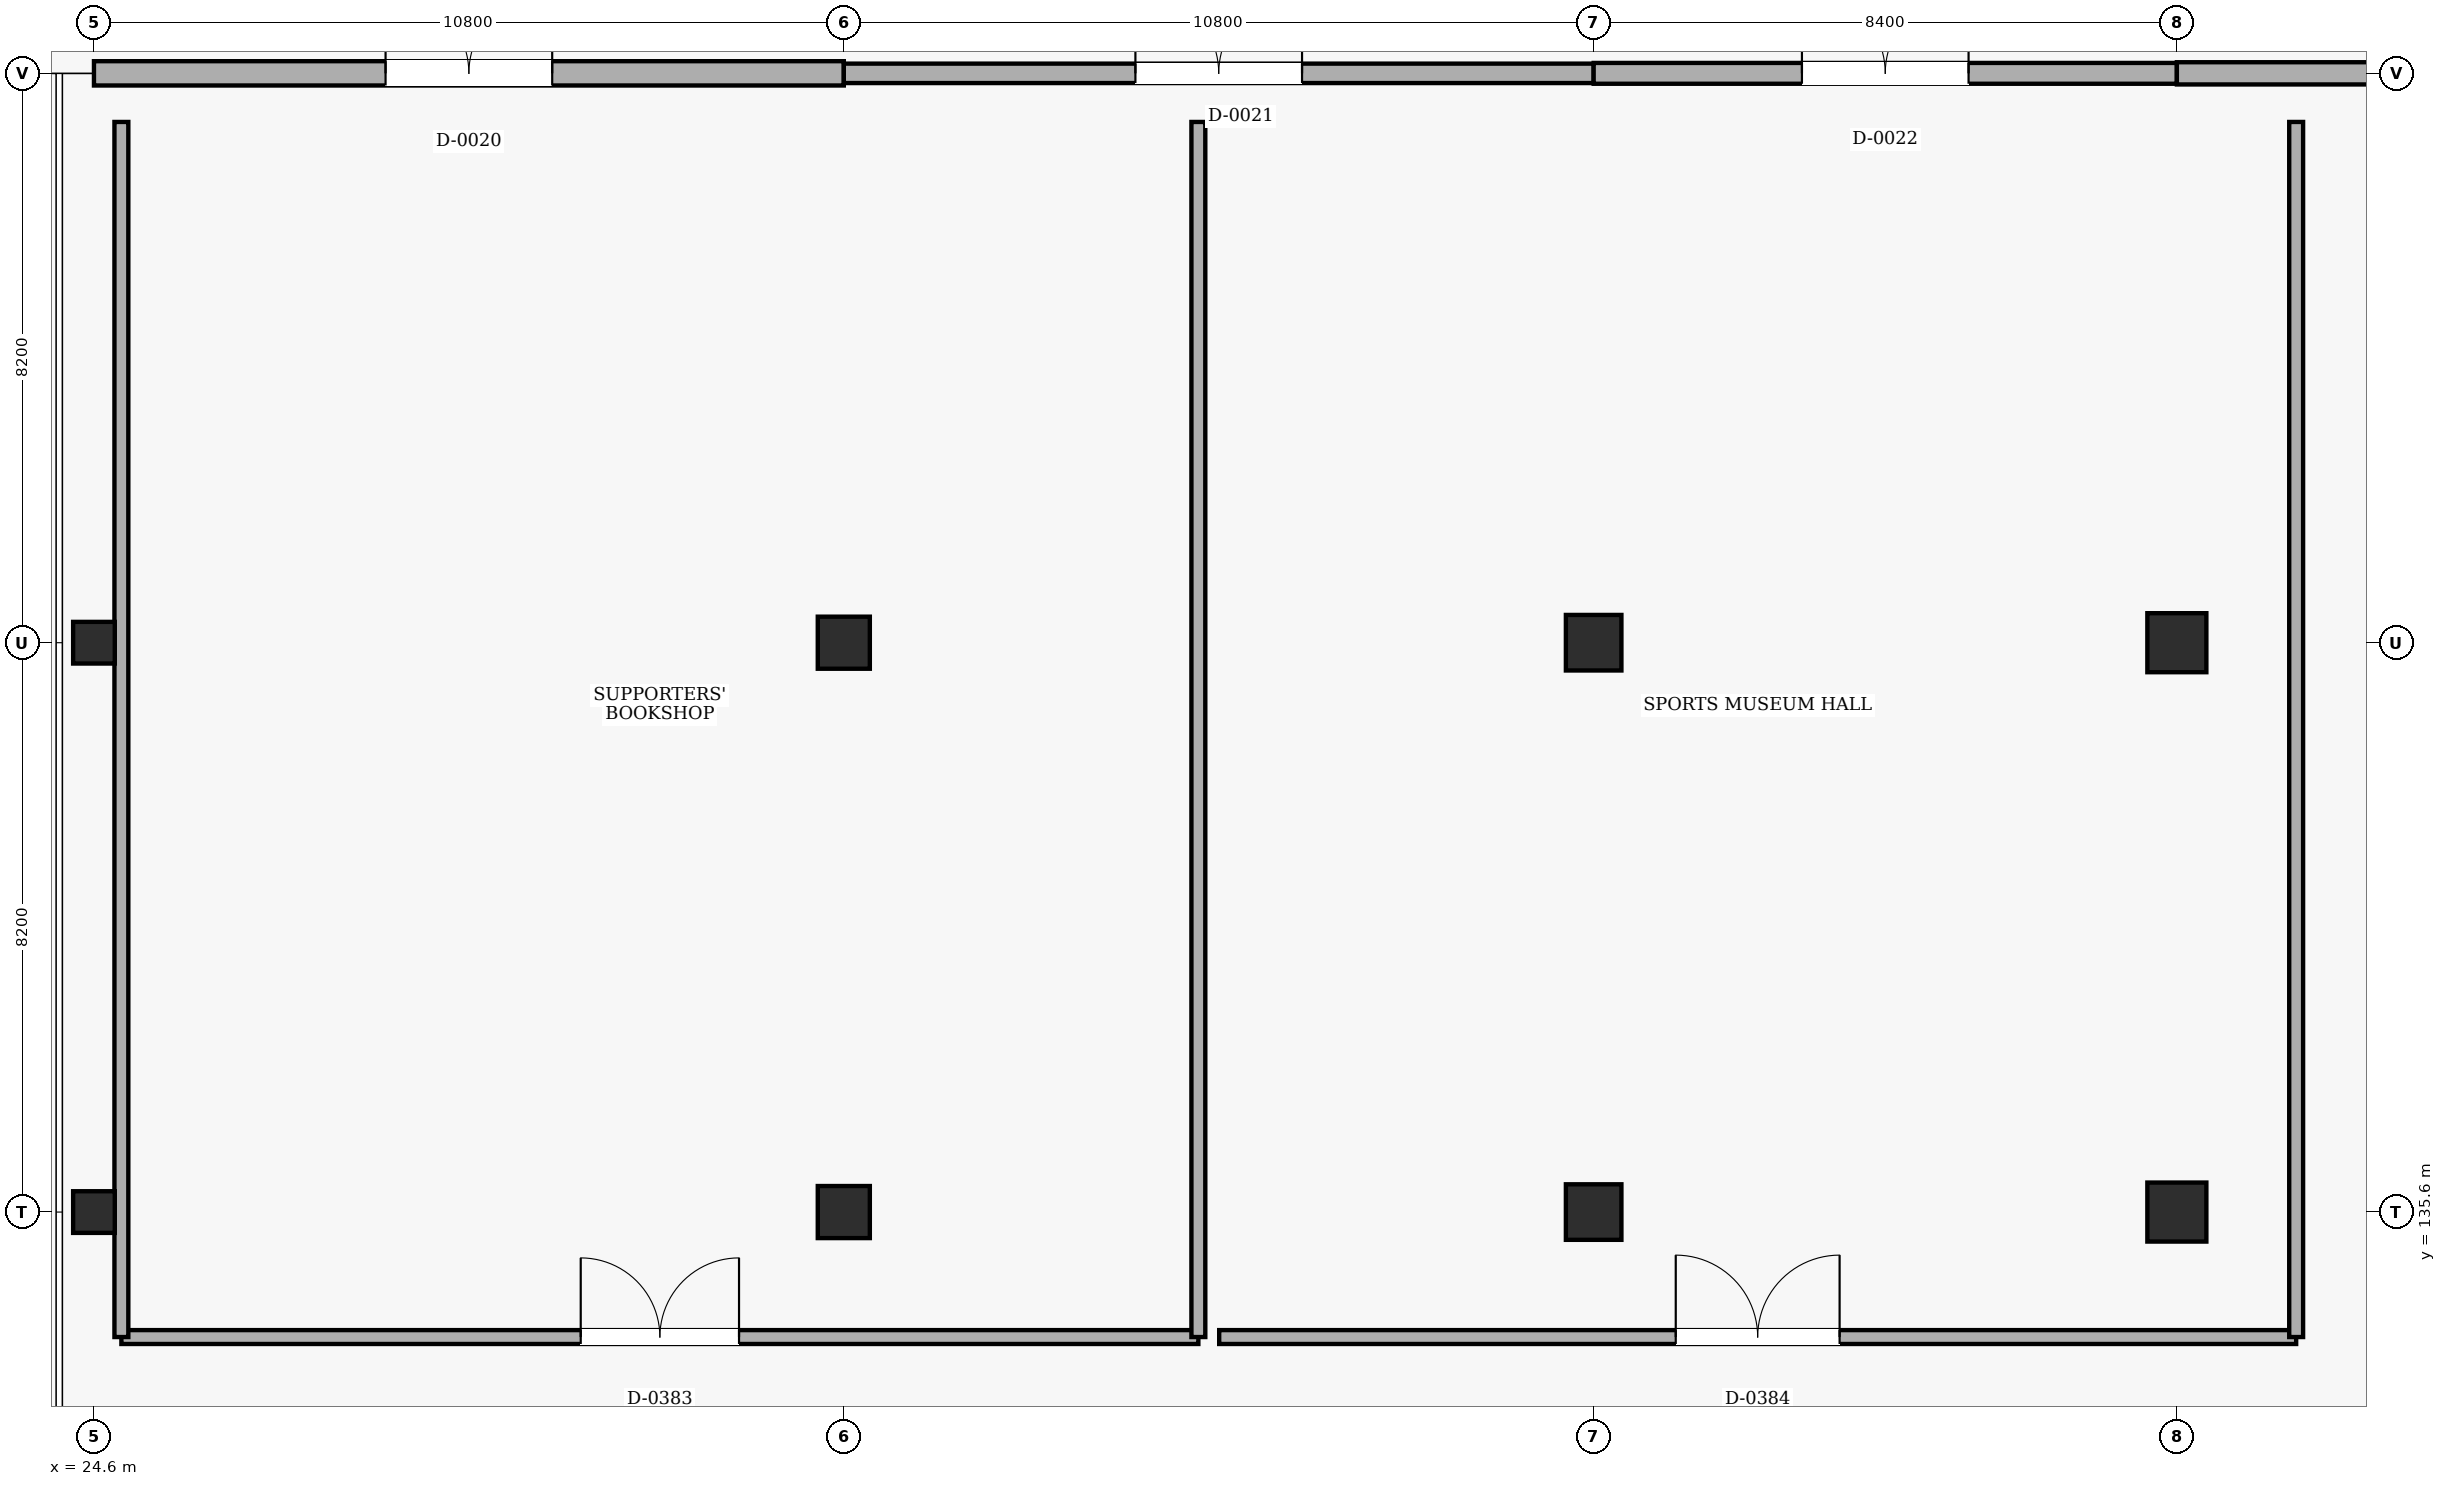
"""IFC4 building model, lengths in metres.
Left out: names, types, materials, properties, quantities, classifications, styles, units other than length and angle.
Written with IfcOpenShell. Run it as: python <this file> out.ifc"""

import sys

from ifc_helpers import new_model, si_unit, direction, frame, frame_2d, origin, origin_2d, place, context, subcontext, project, spatial, rectangle, extrude, element, fill, save


model = new_model("IFC4")
c1 = context("Model", 3, precision=1e-05, world=origin(), true_north=direction((0.0, 1.0)))
c2 = subcontext(c1, "Body", "Model", "MODEL_VIEW")
j1 = project(units=[si_unit("LENGTHUNIT", "METRE"), si_unit("PLANEANGLEUNIT", "RADIAN")], contexts=[c1])
p1 = place(None, origin())
s1 = spatial("IfcSite", under=j1, at=p1, CompositionType="ELEMENT")
p2 = place(p1, origin())
s2 = spatial("IfcBuilding", under=s1, at=p2, CompositionType="ELEMENT")
p3 = place(p2, origin())
s3 = spatial("IfcBuildingStorey", under=s2, at=p3, CompositionType="ELEMENT", Elevation=0.0)
for number, where, z_axis, x_axis in (
    (1, (24.6, 135.6, 0.0), (0.0, 0.0, 1.0), (1.0, 0.0, 0.0)),
    (2, (24.6, 143.8, 0.0), (0.0, 0.0, 1.0), (1.0, 0.0, 0.0)),
):
    element("IfcColumn", number, at=place(p3, frame(where, z_axis=z_axis, x_axis=x_axis)), inside=s3, PredefinedType="COLUMN", context=c2, shape_type="SweptSolid", body=[
        extrude(rectangle(XDim=0.6, YDim=0.6, at=origin_2d()), origin(), (0.0, 0.0, 1.0), 5.4),
    ])
for number, where, z_axis, x_axis in (
    (3, (35.4, 135.6, 0.0), (0.0, 0.0, 1.0), (1.0, 0.0, 0.0)),
    (4, (35.4, 143.8, 0.0), (0.0, 0.0, 1.0), (1.0, 0.0, 0.0)),
):
    element("IfcColumn", number, at=place(p3, frame(where, z_axis=z_axis, x_axis=x_axis)), inside=s3, PredefinedType="COLUMN", context=c2, shape_type="SweptSolid", body=[
        extrude(rectangle(XDim=0.75, YDim=0.75, at=origin_2d()), origin(), (0.0, 0.0, 1.0), 5.4),
    ])
for number, where, z_axis, x_axis in (
    (5, (46.2, 135.6, 0.0), (0.0, 0.0, 1.0), (1.0, 0.0, 0.0)),
    (6, (46.2, 143.8, 0.0), (0.0, 0.0, 1.0), (1.0, 0.0, 0.0)),
):
    element("IfcColumn", number, at=place(p3, frame(where, z_axis=z_axis, x_axis=x_axis)), inside=s3, PredefinedType="COLUMN", context=c2, shape_type="SweptSolid", body=[
        extrude(rectangle(XDim=0.8, YDim=0.8, at=origin_2d()), origin(), (0.0, 0.0, 1.0), 5.4),
    ])
for number, where, z_axis, x_axis in (
    (7, (54.6, 135.6, 0.0), (0.0, 0.0, 1.0), (1.0, 0.0, 0.0)),
    (8, (54.6, 143.8, 0.0), (0.0, 0.0, 1.0), (1.0, 0.0, 0.0)),
):
    element("IfcColumn", number, at=place(p3, frame(where, z_axis=z_axis, x_axis=x_axis)), inside=s3, PredefinedType="COLUMN", context=c2, shape_type="SweptSolid", body=[
        extrude(rectangle(XDim=0.85, YDim=0.85, at=origin_2d()), origin(), (0.0, 0.0, 1.0), 5.4),
    ])
p4 = place(p3, frame((24.6, 152.0, 0.0), z_axis=(0.0, 0.0, 1.0), x_axis=(1.0, 0.0, 0.0)))
e9 = element("IfcWall", 9, at=p4, inside=s3, PredefinedType="SOLIDWALL", context=c2, shape_type="SweptSolid", body=[
    extrude(rectangle(XDim=10.8, YDim=0.35, at=frame_2d((5.4, 0.0))), origin(), (0.0, 0.0, 1.0), 5.08),
])
p5 = place(p4, frame((4.2, 0.0, 0.0)))
e10 = element("IfcOpeningElement", 10, at=p5, cuts=e9, PredefinedType="OPENING", context=c2, shape_type="SweptSolid", body=[
    extrude(rectangle(XDim=2.4, YDim=2.2, at=frame_2d((1.2, 1.1))), frame((0.0, 0.185, 0.0), z_axis=(0.0, -1.0, 0.0), x_axis=(1.0, 0.0, 0.0)), (0.0, 0.0, 1.0), 0.37),
])
p6 = place(p3, frame((35.4, 152.0, 0.0), z_axis=(0.0, 0.0, 1.0), x_axis=(1.0, 0.0, 0.0)))
e11 = element("IfcWall", 11, at=p6, inside=s3, PredefinedType="SOLIDWALL", context=c2, shape_type="SweptSolid", body=[
    extrude(rectangle(XDim=10.8, YDim=0.28, at=frame_2d((5.4, 0.0))), origin(), (0.0, 0.0, 1.0), 5.08),
])
p7 = place(p6, frame((4.2, 0.0, 0.0)))
e12 = element("IfcOpeningElement", 12, at=p7, cuts=e11, PredefinedType="OPENING", context=c2, shape_type="SweptSolid", body=[
    extrude(rectangle(XDim=2.4, YDim=2.2, at=frame_2d((1.2, 1.1))), frame((0.0, 0.15, 0.0), z_axis=(0.0, -1.0, 0.0), x_axis=(1.0, 0.0, 0.0)), (0.0, 0.0, 1.0), 0.3),
])
p8 = place(p3, frame((46.2, 152.0, 0.0), z_axis=(0.0, 0.0, 1.0), x_axis=(1.0, 0.0, 0.0)))
e13 = element("IfcWall", 13, at=p8, inside=s3, PredefinedType="SOLIDWALL", context=c2, shape_type="SweptSolid", body=[
    extrude(rectangle(XDim=8.4, YDim=0.3, at=frame_2d((4.2, 0.0))), origin(), (0.0, 0.0, 1.0), 5.08),
])
p9 = place(p8, frame((3.0, 0.0, 0.0)))
e14 = element("IfcOpeningElement", 14, at=p9, cuts=e13, PredefinedType="OPENING", context=c2, shape_type="SweptSolid", body=[
    extrude(rectangle(XDim=2.4, YDim=2.2, at=frame_2d((1.2, 1.1))), frame((0.0, 0.16, 0.0), z_axis=(0.0, -1.0, 0.0), x_axis=(1.0, 0.0, 0.0)), (0.0, 0.0, 1.0), 0.32),
])
p10 = place(p3, frame((54.6, 152.0, 0.0), z_axis=(0.0, 0.0, 1.0), x_axis=(1.0, 0.0, 0.0)))
e15 = element("IfcWall", 15, at=p10, inside=s3, PredefinedType="SOLIDWALL", context=c2, shape_type="SweptSolid", body=[
    extrude(rectangle(XDim=9.0, YDim=0.32, at=frame_2d((4.5, 0.0))), origin(), (0.0, 0.0, 1.0), 5.08),
])
p11 = place(p10, frame((3.3, 0.0, 0.0)))
e16 = element("IfcOpeningElement", 16, at=p11, cuts=e15, PredefinedType="OPENING", context=c2, shape_type="SweptSolid", body=[
    extrude(rectangle(XDim=2.4, YDim=2.2, at=frame_2d((1.2, 1.1))), frame((0.0, 0.17, 0.0), z_axis=(0.0, -1.0, 0.0), x_axis=(1.0, 0.0, 0.0)), (0.0, 0.0, 1.0), 0.34),
])
p12 = place(p3, frame((24.995, 133.8, 0.0), z_axis=(0.0, 0.0, 1.0), x_axis=(1.0, 0.0, 0.0)))
e17 = element("IfcWall", 17, at=p12, inside=s3, PredefinedType="PARTITIONING", context=c2, shape_type="SweptSolid", body=[
    extrude(rectangle(XDim=15.511, YDim=0.2, at=frame_2d((7.756, 0.0))), origin(), (0.0, 0.0, 1.0), 5.08),
])
p13 = place(p12, frame((6.616, 0.0, 0.0)))
e18 = element("IfcOpeningElement", 18, at=p13, cuts=e17, PredefinedType="OPENING", context=c2, shape_type="SweptSolid", body=[
    extrude(rectangle(XDim=2.28, YDim=2.4, at=frame_2d((1.14, 1.2))), frame((0.0, 0.11, 0.0), z_axis=(0.0, -1.0, 0.0), x_axis=(1.0, 0.0, 0.0)), (0.0, 0.0, 1.0), 0.22),
])
p14 = place(p3, frame((40.507, 133.8, 0.0), z_axis=(0.0, 0.0, 1.0), x_axis=(0.0, 1.0, 0.0)))
e19 = element("IfcWall", 19, at=p14, inside=s3, PredefinedType="PARTITIONING", context=c2, shape_type="SweptSolid", body=[
    extrude(rectangle(XDim=17.5, YDim=0.2, at=frame_2d((8.75, 0.0))), origin(), (0.0, 0.0, 1.0), 5.08),
])
p15 = place(p3, frame((24.995, 151.3, 0.0), z_axis=(0.0, 0.0, 1.0), x_axis=(0.0, -1.0, 0.0)))
e20 = element("IfcWall", 20, at=p15, inside=s3, PredefinedType="PARTITIONING", context=c2, shape_type="SweptSolid", body=[
    extrude(rectangle(XDim=17.5, YDim=0.2, at=frame_2d((8.75, 0.0))), origin(), (0.0, 0.0, 1.0), 4.46),
])
p16 = place(p3, frame((40.807, 133.8, 0.0), z_axis=(0.0, 0.0, 1.0), x_axis=(1.0, 0.0, 0.0)))
e21 = element("IfcWall", 21, at=p16, inside=s3, PredefinedType="PARTITIONING", context=c2, shape_type="SweptSolid", body=[
    extrude(rectangle(XDim=15.512, YDim=0.2, at=frame_2d((7.756, 0.0))), origin(), (0.0, 0.0, 1.0), 5.08),
])
p17 = place(p16, frame((6.576, 0.0, 0.0)))
e22 = element("IfcOpeningElement", 22, at=p17, cuts=e21, PredefinedType="OPENING", context=c2, shape_type="SweptSolid", body=[
    extrude(rectangle(XDim=2.36, YDim=2.4, at=frame_2d((1.18, 1.2))), frame((0.0, 0.11, 0.0), z_axis=(0.0, -1.0, 0.0), x_axis=(1.0, 0.0, 0.0)), (0.0, 0.0, 1.0), 0.22),
])
p18 = place(p3, frame((56.318, 133.8, 0.0), z_axis=(0.0, 0.0, 1.0), x_axis=(0.0, 1.0, 0.0)))
e23 = element("IfcWall", 23, at=p18, inside=s3, PredefinedType="PARTITIONING", context=c2, shape_type="SweptSolid", body=[
    extrude(rectangle(XDim=17.5, YDim=0.2, at=frame_2d((8.75, 0.0))), origin(), (0.0, 0.0, 1.0), 5.08),
])
p19 = place(p5, origin())
e24 = element("IfcDoor", 24, at=p19, inside=s3, OperationType="DOUBLE_DOOR_SINGLE_SWING", PredefinedType="DOOR", context=c2, shape_type="SweptSolid", body=[
    extrude(rectangle(XDim=2.4, YDim=2.2, at=frame_2d((1.2, 1.1))), frame((0.0, 0.025, 0.0), z_axis=(0.0, -1.0, 0.0), x_axis=(1.0, 0.0, 0.0)), (0.0, 0.0, 1.0), 0.05),
])
fill(e10, e24)
p20 = place(p7, origin())
e25 = element("IfcDoor", 25, at=p20, inside=s3, OperationType="DOUBLE_DOOR_SINGLE_SWING", PredefinedType="DOOR", context=c2, shape_type="SweptSolid", body=[
    extrude(rectangle(XDim=2.4, YDim=2.2, at=frame_2d((1.2, 1.1))), frame((0.0, 0.025, 0.0), z_axis=(0.0, -1.0, 0.0), x_axis=(1.0, 0.0, 0.0)), (0.0, 0.0, 1.0), 0.05),
])
fill(e12, e25)
p21 = place(p9, origin())
e26 = element("IfcDoor", 26, at=p21, inside=s3, OperationType="DOUBLE_DOOR_SINGLE_SWING", PredefinedType="DOOR", context=c2, shape_type="SweptSolid", body=[
    extrude(rectangle(XDim=2.4, YDim=2.2, at=frame_2d((1.2, 1.1))), frame((0.0, 0.025, 0.0), z_axis=(0.0, -1.0, 0.0), x_axis=(1.0, 0.0, 0.0)), (0.0, 0.0, 1.0), 0.05),
])
fill(e14, e26)
p22 = place(p13, origin())
e27 = element("IfcDoor", 27, at=p22, inside=s3, OperationType="DOUBLE_DOOR_SINGLE_SWING", PredefinedType="DOOR", context=c2, shape_type="SweptSolid", body=[
    extrude(rectangle(XDim=2.28, YDim=2.4, at=frame_2d((1.14, 1.2))), frame((0.0, 0.025, 0.0), z_axis=(0.0, -1.0, 0.0), x_axis=(1.0, 0.0, 0.0)), (0.0, 0.0, 1.0), 0.05),
])
fill(e18, e27)
p23 = place(p17, origin())
e28 = element("IfcDoor", 28, at=p23, inside=s3, OperationType="DOUBLE_DOOR_SINGLE_SWING", PredefinedType="DOOR", context=c2, shape_type="SweptSolid", body=[
    extrude(rectangle(XDim=2.36, YDim=2.4, at=frame_2d((1.18, 1.2))), frame((0.0, 0.025, 0.0), z_axis=(0.0, -1.0, 0.0), x_axis=(1.0, 0.0, 0.0)), (0.0, 0.0, 1.0), 0.05),
])
fill(e22, e28)
save(model, sys.argv[1])
